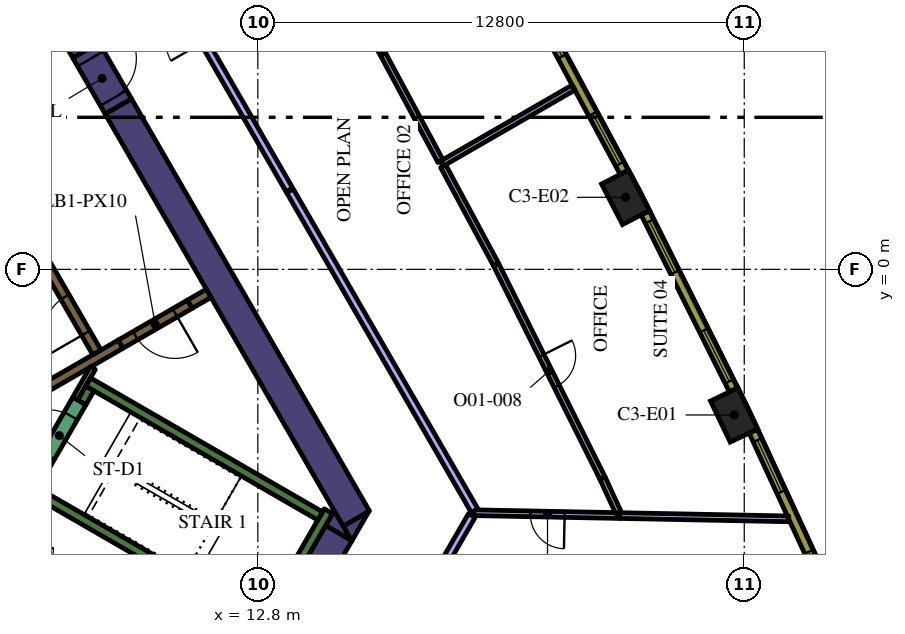
"""IFC4 building model, lengths in metres.
Left out: names, types, materials, properties, quantities, classifications, styles, units other than length and angle.
Written with IfcOpenShell. Run it as: python <this file> out.ifc"""

import sys

from ifc_helpers import new_model, si_unit, direction, frame, frame_2d, origin, origin_2d, place, context, subcontext, project, spatial, polyline, rectangle, outline, extrude, element, fill, save


model = new_model("IFC4")
c1 = context("Model", 3, precision=1e-05, world=origin(), true_north=direction((0.0, 1.0)))
c2 = subcontext(c1, "Body", "Model", "MODEL_VIEW")
j1 = project(units=[si_unit("LENGTHUNIT", "METRE"), si_unit("PLANEANGLEUNIT", "RADIAN")], contexts=[c1])
p1 = place(None, origin())
s1 = spatial("IfcSite", under=j1, at=p1, CompositionType="ELEMENT")
p2 = place(p1, origin())
s2 = spatial("IfcBuilding", under=s1, at=p2, CompositionType="ELEMENT")
p3 = place(p2, frame((0.0, 0.0, 150.0)))
s3 = spatial("IfcBuildingStorey", under=s2, at=p3, CompositionType="ELEMENT", Elevation=150.0)
for number, where, z_axis, x_axis in (
    (1, (25.332, -3.832, 0.0), (0.0, 0.0, 1.0), (-0.433, 0.902, 0.0)),
    (2, (22.476, 1.896, 0.0), (0.0, 0.0, 1.0), (-0.46, 0.888, 0.0)),
):
    element("IfcColumn", number, at=place(p3, frame(where, z_axis=z_axis, x_axis=x_axis)), inside=s3, PredefinedType="COLUMN", context=c2, shape_type="SweptSolid", body=[
        extrude(rectangle(XDim=1.2, YDim=0.8, at=origin_2d()), origin(), (0.0, 0.0, 1.0), 4.2),
    ])
p4 = place(p3, frame((9.129, 4.289, 0.0), z_axis=(0.0, 0.0, 1.0), x_axis=(0.499995742806, -0.866027861663, 0.0)))
e3 = element("IfcWall", 3, at=p4, inside=s3, PredefinedType="SOLIDWALL", context=c2, shape_type="SweptSolid", body=[
    extrude(rectangle(XDim=12.527, YDim=0.8, at=frame_2d((6.264, 0.0))), origin(), (0.0, 0.0, 1.0), 4.2),
])
p5 = place(p3, origin())
e4 = element("IfcWall", 4, at=p5, inside=s3, PredefinedType="SOLIDWALL", context=c2, shape_type="SweptSolid", body=[
    extrude(outline(polyline([(15.271, -7.15), (15.047, -6.762), (15.719, -6.374), (15.271, -7.15)])), origin(), (0.0, 0.0, 1.0), 4.2),
])
p6 = place(p3, frame((13.018, -10.252, 0.0), z_axis=(0.0, 0.0, 1.0), x_axis=(0.499984020225, 0.866034629516, 0.0)))
e5 = element("IfcWall", 5, at=p6, inside=s3, PredefinedType="SOLIDWALL", context=c2, shape_type="SweptSolid", body=[
    extrude(rectangle(XDim=3.824, YDim=0.8, at=frame_2d((1.912, 0.0))), origin(), (0.0, 0.0, 1.0), 4.2),
])
e6 = element("IfcWall", 6, at=p5, inside=s3, PredefinedType="SOLIDWALL", context=c2, shape_type="SweptSolid", body=[
    extrude(outline(polyline([(14.809, -6.35), (15.257, -7.126), (14.585, -6.738), (14.809, -6.35)])), origin(), (0.0, 0.0, 1.0), 4.2),
])
p7 = place(p3, frame((5.615, 10.375, 0.0), z_axis=(0.0, 0.0, 1.0), x_axis=(0.500002746266, -0.866023818221, 0.0)))
e7 = element("IfcWall", 7, at=p7, inside=s3, PredefinedType="SOLIDWALL", context=c2, shape_type="SweptSolid", body=[
    extrude(rectangle(XDim=5.328, YDim=0.8, at=frame_2d((2.664, 0.0))), origin(), (0.0, 0.0, 1.0), 4.2),
])
p8 = place(p3, frame((12.84, -9.511, 0.0), z_axis=(0.0, 0.0, 1.0), x_axis=(0.499997733992, 0.866026712061, 0.0)))
e8 = element("IfcWall", 8, at=p8, inside=s3, PredefinedType="SOLIDWALL", context=c2, shape_type="SweptSolid", body=[
    extrude(rectangle(XDim=3.634, YDim=0.25, at=frame_2d((1.817, 0.0))), origin(), (0.0, 0.0, 1.0), 4.2),
])
p9 = place(p3, frame((12.84, -9.261, 0.0), z_axis=(0.0, 0.0, 1.0), x_axis=(-0.866013990052, 0.500019768644, 0.0)))
e9 = element("IfcWall", 9, at=p9, inside=s3, PredefinedType="SOLIDWALL", context=c2, shape_type="SweptSolid", body=[
    extrude(rectangle(XDim=6.8, YDim=0.25, at=frame_2d((3.4, 0.0))), origin(), (0.0, 0.0, 1.0), 4.2),
])
p10 = place(p3, frame((8.334, -2.964, 0.0), z_axis=(0.0, 0.0, 1.0), x_axis=(0.866016039709, -0.500016218704, 0.0)))
e10 = element("IfcWall", 10, at=p10, inside=s3, PredefinedType="SOLIDWALL", context=c2, shape_type="SweptSolid", body=[
    extrude(rectangle(XDim=7.05, YDim=0.25, at=frame_2d((3.525, 0.0))), origin(), (0.0, 0.0, 1.0), 4.2),
])
p11 = place(p3, frame((8.168, -3.503, 0.0), z_axis=(0.0, 0.0, 1.0), x_axis=(0.49972245349, 0.866185586049, 0.0)))
e11 = element("IfcWall", 11, at=p11, inside=s3, PredefinedType="SOLIDWALL", context=c2, shape_type="SweptSolid", body=[
    extrude(rectangle(XDim=0.425, YDim=0.25, at=frame_2d((0.212, 0.0))), origin(), (0.0, 0.0, 1.0), 4.2),
])
p12 = place(p3, frame((9.19, -1.969, 0.0), z_axis=(0.0, 0.0, 1.0), x_axis=(-0.866057109641, -0.499945079824, 0.0)))
e12 = element("IfcWall", 12, at=p12, inside=s3, PredefinedType="SOLIDWALL", context=c2, shape_type="SweptSolid", body=[
    extrude(rectangle(XDim=3.291, YDim=0.25, at=frame_2d((1.646, 0.0))), origin(), (0.0, 0.0, 1.0), 4.2),
])
p13 = place(p3, frame((11.507, -0.631, 0.0), z_axis=(0.0, 0.0, 1.0), x_axis=(-0.866093731455, -0.499881634324, 0.0)))
e13 = element("IfcWall", 13, at=p13, inside=s3, PredefinedType="SOLIDWALL", context=c2, shape_type="SweptSolid", body=[
    extrude(rectangle(XDim=0.575, YDim=0.25, at=frame_2d((0.288, 0.0))), origin(), (0.0, 0.0, 1.0), 4.2),
])
p14 = place(p3, frame((8.459, -2.599, 0.0), z_axis=(0.0, 0.0, 1.0), x_axis=(-0.500041054325, -0.866001699761, 0.0)))
e14 = element("IfcWall", 14, at=p14, inside=s3, PredefinedType="PARTITIONING", context=c2, shape_type="SweptSolid", body=[
    extrude(rectangle(XDim=0.929, YDim=0.15, at=frame_2d((0.464, 0.0))), origin(), (0.0, 0.0, 1.0), 4.2),
])
p15 = place(p3, frame((8.565, -2.185, 0.0), z_axis=(0.0, 0.0, 1.0), x_axis=(-0.499997954832, 0.866026584559, 0.0)))
e15 = element("IfcWall", 15, at=p15, inside=s3, PredefinedType="SOLIDWALL", context=c2, shape_type="SweptSolid", body=[
    extrude(rectangle(XDim=12.35, YDim=0.25, at=frame_2d((6.175, 0.0))), origin(), (0.0, 0.0, 1.0), 4.2),
])
p16 = place(p15, frame((0.585, 0.0, 0.0)))
e16 = element("IfcOpeningElement", 16, at=p16, cuts=e15, PredefinedType="OPENING", context=c2, shape_type="SweptSolid", body=[
    extrude(rectangle(XDim=1.1, YDim=2.1, at=frame_2d((0.55, 1.05))), frame((0.0, 0.135, 0.0), z_axis=(0.0, -1.0, 0.0), x_axis=(1.0, 0.0, 0.0)), (0.0, 0.0, 1.0), 0.27),
])
p17 = place(p3, frame((7.053, -5.284, 0.0), z_axis=(0.0, 0.0, 1.0), x_axis=(0.500078061341, 0.865980330357, 0.0)))
e17 = element("IfcWall", 17, at=p17, inside=s3, PredefinedType="SOLIDWALL", context=c2, shape_type="SweptSolid", body=[
    extrude(rectangle(XDim=2.1, YDim=0.4, at=frame_2d((1.05, 0.0))), origin(), (0.0, 0.0, 1.0), 4.2),
])
p18 = place(p17, frame((0.45, 0.0, 0.0)))
e18 = element("IfcOpeningElement", 18, at=p18, cuts=e17, PredefinedType="OPENING", context=c2, shape_type="SweptSolid", body=[
    extrude(rectangle(XDim=1.2, YDim=2.1, at=frame_2d((0.6, 1.05))), frame((0.0, 0.21, 0.0), z_axis=(0.0, -1.0, 0.0), x_axis=(1.0, 0.0, 0.0)), (0.0, 0.0, 1.0), 0.42),
])
p19 = place(p3, frame((11.009, -0.919, 0.0), z_axis=(0.0, 0.0, 1.0), x_axis=(-0.866059744384, -0.49994051562, 0.0)))
e19 = element("IfcWall", 19, at=p19, inside=s3, PredefinedType="SOLIDWALL", context=c2, shape_type="SweptSolid", body=[
    extrude(rectangle(XDim=2.1, YDim=0.25, at=frame_2d((1.05, 0.0))), origin(), (0.0, 0.0, 1.0), 4.2),
])
p20 = place(p19, frame((0.45, 0.0, 0.0)))
e20 = element("IfcOpeningElement", 20, at=p20, cuts=e19, PredefinedType="OPENING", context=c2, shape_type="SweptSolid", body=[
    extrude(rectangle(XDim=1.2, YDim=2.1, at=frame_2d((0.6, 1.05))), frame((0.0, 0.135, 0.0), z_axis=(0.0, -1.0, 0.0), x_axis=(1.0, 0.0, 0.0)), (0.0, 0.0, 1.0), 0.27),
])
p21 = place(p3, frame((8.279, 5.761, 0.0), z_axis=(0.0, 0.0, 1.0), x_axis=(0.500062241894, -0.865989465428, 0.0)))
e21 = element("IfcWall", 21, at=p21, inside=s3, PredefinedType="SOLIDWALL", context=c2, shape_type="SweptSolid", body=[
    extrude(rectangle(XDim=1.7, YDim=0.8, at=frame_2d((0.85, 0.0))), origin(), (0.0, 0.0, 1.0), 4.2),
])
p22 = place(p21, frame((0.25, 0.0, 0.0)))
e22 = element("IfcOpeningElement", 22, at=p22, cuts=e21, PredefinedType="OPENING", context=c2, shape_type="SweptSolid", body=[
    extrude(rectangle(XDim=1.2, YDim=2.1, at=frame_2d((0.6, 1.05))), frame((0.0, 0.41, 0.0), z_axis=(0.0, -1.0, 0.0), x_axis=(1.0, 0.0, 0.0)), (0.0, 0.0, 1.0), 0.82),
])
p23 = place(p3, frame((22.32, -6.479, 0.0), z_axis=(0.0, 0.0, 1.0), x_axis=(0.999809252738, -0.019530953357, 0.0)))
e23 = element("IfcWall", 23, at=p23, inside=s3, PredefinedType="PARTITIONING", context=c2, shape_type="SweptSolid", body=[
    extrude(rectangle(XDim=4.45, YDim=0.15, at=frame_2d((2.225, 0.0))), origin(), (0.0, 0.0, 1.0), 3.15),
])
p24 = place(p3, frame((22.328, -6.479, 0.0), z_axis=(0.0, 0.0, 1.0), x_axis=(-0.999809811932, 0.019502306655, 0.0)))
e24 = element("IfcWall", 24, at=p24, inside=s3, PredefinedType="PARTITIONING", context=c2, shape_type="SweptSolid", body=[
    extrude(rectangle(XDim=3.856, YDim=0.15, at=frame_2d((1.928, 0.0))), origin(), (0.0, 0.0, 1.0), 3.15),
])
p25 = place(p24, frame((1.456, 0.0, 0.0)))
e25 = element("IfcOpeningElement", 25, at=p25, cuts=e24, PredefinedType="OPENING", context=c2, shape_type="SweptSolid", body=[
    extrude(rectangle(XDim=0.9, YDim=2.1, at=frame_2d((0.45, 1.05))), frame((0.0, 0.085, 0.0), z_axis=(0.0, -1.0, 0.0), x_axis=(1.0, 0.0, 0.0)), (0.0, 0.0, 1.0), 0.17),
])
p26 = place(p3, frame((16.678, -9.513, 0.0), z_axis=(0.0, 0.0, 1.0), x_axis=(0.500011844827, 0.866018565062, 0.0)))
e26 = element("IfcWall", 26, at=p26, inside=s3, PredefinedType="PARTITIONING", context=c2, shape_type="SweptSolid", body=[
    extrude(rectangle(XDim=3.505, YDim=0.2, at=frame_2d((1.753, 0.0))), origin(), (0.0, 0.0, 1.0), 3.15),
])
p27 = place(p3, frame((17.641, 2.781, 0.0), z_axis=(0.0, 0.0, 1.0), x_axis=(0.866053520969, 0.499951296445, 0.0)))
e27 = element("IfcWall", 27, at=p27, inside=s3, PredefinedType="PARTITIONING", context=c2, shape_type="SweptSolid", body=[
    extrude(rectangle(XDim=4.002, YDim=0.15, at=frame_2d((2.001, 0.0))), origin(), (0.0, 0.0, 1.0), 3.15),
])
p28 = place(p3, frame((22.289, -6.403, 0.0), z_axis=(0.0, 0.0, 1.0), x_axis=(-0.41893460807, 0.908016406328, 0.0)))
e28 = element("IfcWall", 28, at=p28, inside=s3, PredefinedType="PARTITIONING", context=c2, shape_type="SweptSolid", body=[
    extrude(rectangle(XDim=1.002, YDim=0.15, at=frame_2d((0.501, 0.0))), origin(), (0.0, 0.0, 1.0), 3.15),
])
p29 = place(p3, frame((19.066, 0.129, 0.0), z_axis=(0.0, 0.0, 1.0), x_axis=(0.446202922071, -0.89493181435, 0.0)))
e29 = element("IfcWall", 29, at=p29, inside=s3, PredefinedType="PARTITIONING", context=c2, shape_type="SweptSolid", body=[
    extrude(rectangle(XDim=6.282, YDim=0.15, at=frame_2d((3.141, 0.0))), origin(), (0.0, 0.0, 1.0), 3.15),
])
p30 = place(p29, frame((2.683, 0.0, 0.0)))
e30 = element("IfcOpeningElement", 30, at=p30, cuts=e29, PredefinedType="OPENING", context=c2, shape_type="SweptSolid", body=[
    extrude(rectangle(XDim=0.9, YDim=2.1, at=frame_2d((0.45, 1.05))), frame((0.0, 0.085, 0.0), z_axis=(0.0, -1.0, 0.0), x_axis=(1.0, 0.0, 0.0)), (0.0, 0.0, 1.0), 0.17),
])
p31 = place(p3, frame((19.066, 0.129, 0.0), z_axis=(0.0, 0.0, 1.0), x_axis=(-0.473335829303, 0.880882053795, 0.0)))
e31 = element("IfcWall", 31, at=p31, inside=s3, PredefinedType="PARTITIONING", context=c2, shape_type="SweptSolid", body=[
    extrude(rectangle(XDim=2.935, YDim=0.15, at=frame_2d((1.468, 0.0))), origin(), (0.0, 0.0, 1.0), 3.15),
])
p32 = place(p3, frame((17.606, 2.847, 0.0), z_axis=(0.0, 0.0, 1.0), x_axis=(-0.473348321673, 0.880875340993, 0.0)))
e32 = element("IfcWall", 32, at=p32, inside=s3, PredefinedType="PARTITIONING", context=c2, shape_type="SweptSolid", body=[
    extrude(rectangle(XDim=3.197, YDim=0.15, at=frame_2d((1.599, 0.0))), origin(), (0.0, 0.0, 1.0), 3.15),
])
p33 = place(p3, frame((12.951, 11.104, 0.0), z_axis=(0.0, 0.0, 1.0), x_axis=(0.499992691614, -0.866029623242, 0.0)))
e33 = element("IfcWall", 33, at=p33, inside=s3, PredefinedType="PARTITIONING", context=c2, shape_type="SweptSolid", body=[
    extrude(rectangle(XDim=6.282, YDim=0.15, at=frame_2d((3.141, 0.0))), origin(), (0.0, 0.0, 1.0), 3.15),
])
p34 = place(p33, frame((2.683, 0.0, 0.0)))
e34 = element("IfcOpeningElement", 34, at=p34, cuts=e33, PredefinedType="OPENING", context=c2, shape_type="SweptSolid", body=[
    extrude(rectangle(XDim=0.9, YDim=2.1, at=frame_2d((0.45, 1.05))), frame((0.0, 0.085, 0.0), z_axis=(0.0, -1.0, 0.0), x_axis=(1.0, 0.0, 0.0)), (0.0, 0.0, 1.0), 0.17),
])
p35 = place(p3, frame((13.63, 2.091, 0.0), z_axis=(0.0, 0.0, 1.0), x_axis=(-0.499990634175, 0.866030811078, 0.0)))
e35 = element("IfcWall", 35, at=p35, inside=s3, PredefinedType="PARTITIONING", context=c2, shape_type="SweptSolid", body=[
    extrude(rectangle(XDim=10.008, YDim=0.2, at=frame_2d((5.004, 0.0))), origin(), (0.0, 0.0, 1.0), 3.15),
])
p36 = place(p35, frame((4.5, 0.0, 0.0)))
e36 = element("IfcOpeningElement", 36, at=p36, cuts=e35, PredefinedType="OPENING", context=c2, shape_type="SweptSolid", body=[
    extrude(rectangle(XDim=1.0, YDim=2.1, at=frame_2d((0.5, 1.05))), frame((0.0, 0.11, 0.0), z_axis=(0.0, -1.0, 0.0), x_axis=(1.0, 0.0, 0.0)), (0.0, 0.0, 1.0), 0.22),
])
p37 = place(p3, frame((18.504, -6.35, 0.0), z_axis=(0.0, 0.0, 1.0), x_axis=(-0.499995029582, 0.866028273438, 0.0)))
e37 = element("IfcWall", 37, at=p37, inside=s3, PredefinedType="PARTITIONING", context=c2, shape_type="SweptSolid", body=[
    extrude(rectangle(XDim=9.717, YDim=0.2, at=frame_2d((4.859, 0.0))), origin(), (0.0, 0.0, 1.0), 3.15),
])
p38 = place(p3, frame((28.02, -8.992, 0.0), z_axis=(0.0, 0.0, 1.0), x_axis=(-0.418722559465, 0.908114209885, 0.0)))
e38 = element("IfcWall", 38, at=p38, inside=s3, PredefinedType="SOLIDWALL", context=c2, shape_type="SweptSolid", body=[
    extrude(rectangle(XDim=5.213, YDim=0.24, at=frame_2d((2.606, 0.0))), origin(), (0.0, 0.0, 1.0), 3.95),
])
p39 = place(p38, frame((0.221, 0.0, 0.9)))
e39 = element("IfcOpeningElement", 39, at=p39, cuts=e38, PredefinedType="OPENING", context=c2, shape_type="SweptSolid", body=[
    extrude(rectangle(XDim=1.5, YDim=2.55, at=frame_2d((0.75, 1.275))), frame((0.0, 0.13, 0.0), z_axis=(0.0, -1.0, 0.0), x_axis=(1.0, 0.0, 0.0)), (0.0, 0.0, 1.0), 0.26),
])
p40 = place(p38, frame((3.452, 0.0, 0.9)))
e40 = element("IfcOpeningElement", 40, at=p40, cuts=e38, PredefinedType="OPENING", context=c2, shape_type="SweptSolid", body=[
    extrude(rectangle(XDim=1.5, YDim=2.55, at=frame_2d((0.75, 1.275))), frame((0.0, 0.13, 0.0), z_axis=(0.0, -1.0, 0.0), x_axis=(1.0, 0.0, 0.0)), (0.0, 0.0, 1.0), 0.26),
])
p41 = place(p3, frame((25.316, -3.171, 0.0), z_axis=(0.0, 0.0, 1.0), x_axis=(-0.446256171312, 0.8949052629, 0.0)))
e41 = element("IfcWall", 41, at=p41, inside=s3, PredefinedType="SOLIDWALL", context=c2, shape_type="SweptSolid", body=[
    extrude(rectangle(XDim=5.203, YDim=0.24, at=frame_2d((2.602, 0.0))), origin(), (0.0, 0.0, 1.0), 3.95),
])
p42 = place(p41, frame((0.248, 0.0, 0.9)))
e42 = element("IfcOpeningElement", 42, at=p42, cuts=e41, PredefinedType="OPENING", context=c2, shape_type="SweptSolid", body=[
    extrude(rectangle(XDim=1.5, YDim=2.55, at=frame_2d((0.75, 1.275))), frame((0.0, 0.13, 0.0), z_axis=(0.0, -1.0, 0.0), x_axis=(1.0, 0.0, 0.0)), (0.0, 0.0, 1.0), 0.26),
])
p43 = place(p41, frame((3.455, 0.0, 0.9)))
e43 = element("IfcOpeningElement", 43, at=p43, cuts=e41, PredefinedType="OPENING", context=c2, shape_type="SweptSolid", body=[
    extrude(rectangle(XDim=1.5, YDim=2.55, at=frame_2d((0.75, 1.275))), frame((0.0, 0.13, 0.0), z_axis=(0.0, -1.0, 0.0), x_axis=(1.0, 0.0, 0.0)), (0.0, 0.0, 1.0), 0.26),
])
p44 = place(p3, frame((22.44, 2.555, 0.0), z_axis=(0.0, 0.0, 1.0), x_axis=(-0.473349833294, 0.880874528704, 0.0)))
e44 = element("IfcWall", 44, at=p44, inside=s3, PredefinedType="SOLIDWALL", context=c2, shape_type="SweptSolid", body=[
    extrude(rectangle(XDim=5.204, YDim=0.24, at=frame_2d((2.602, 0.0))), origin(), (0.0, 0.0, 1.0), 3.95),
])
p45 = place(p44, frame((0.248, 0.0, 0.9)))
e45 = element("IfcOpeningElement", 45, at=p45, cuts=e44, PredefinedType="OPENING", context=c2, shape_type="SweptSolid", body=[
    extrude(rectangle(XDim=1.5, YDim=2.55, at=frame_2d((0.75, 1.275))), frame((0.0, 0.13, 0.0), z_axis=(0.0, -1.0, 0.0), x_axis=(1.0, 0.0, 0.0)), (0.0, 0.0, 1.0), 0.26),
])
p46 = place(p44, frame((3.455, 0.0, 0.9)))
e46 = element("IfcOpeningElement", 46, at=p46, cuts=e44, PredefinedType="OPENING", context=c2, shape_type="SweptSolid", body=[
    extrude(rectangle(XDim=1.5, YDim=2.55, at=frame_2d((0.75, 1.275))), frame((0.0, 0.13, 0.0), z_axis=(0.0, -1.0, 0.0), x_axis=(1.0, 0.0, 0.0)), (0.0, 0.0, 1.0), 0.26),
])
p47 = place(p16, origin())
e47 = element("IfcDoor", 47, at=p47, inside=s3, OperationType="DOUBLE_DOOR_SLIDING", PredefinedType="DOOR", context=c2, shape_type="SweptSolid", body=[
    extrude(rectangle(XDim=1.1, YDim=2.1, at=frame_2d((0.55, 1.05))), frame((0.0, 0.025, 0.0), z_axis=(0.0, -1.0, 0.0), x_axis=(1.0, 0.0, 0.0)), (0.0, 0.0, 1.0), 0.05),
])
fill(e16, e47)
p48 = place(p18, origin())
e48 = element("IfcDoor", 48, at=p48, inside=s3, OperationType="SINGLE_SWING_LEFT", PredefinedType="DOOR", context=c2, shape_type="SweptSolid", body=[
    extrude(rectangle(XDim=1.2, YDim=2.1, at=frame_2d((0.6, 1.05))), frame((0.0, 0.025, 0.0), z_axis=(0.0, -1.0, 0.0), x_axis=(1.0, 0.0, 0.0)), (0.0, 0.0, 1.0), 0.05),
])
fill(e18, e48)
p49 = place(p20, origin())
e49 = element("IfcDoor", 49, at=p49, inside=s3, OperationType="SINGLE_SWING_LEFT", PredefinedType="DOOR", context=c2, shape_type="SweptSolid", body=[
    extrude(rectangle(XDim=1.2, YDim=2.1, at=frame_2d((0.6, 1.05))), frame((0.0, 0.025, 0.0), z_axis=(0.0, -1.0, 0.0), x_axis=(1.0, 0.0, 0.0)), (0.0, 0.0, 1.0), 0.05),
])
fill(e20, e49)
p50 = place(p22, origin())
e50 = element("IfcDoor", 50, at=p50, inside=s3, OperationType="SINGLE_SWING_LEFT", PredefinedType="DOOR", context=c2, shape_type="SweptSolid", body=[
    extrude(rectangle(XDim=1.2, YDim=2.1, at=frame_2d((0.6, 1.05))), frame((0.0, 0.025, 0.0), z_axis=(0.0, -1.0, 0.0), x_axis=(1.0, 0.0, 0.0)), (0.0, 0.0, 1.0), 0.05),
])
fill(e22, e50)
p51 = place(p25, origin())
e51 = element("IfcDoor", 51, at=p51, inside=s3, OperationType="SINGLE_SWING_LEFT", PredefinedType="DOOR", context=c2, shape_type="SweptSolid", body=[
    extrude(rectangle(XDim=0.9, YDim=2.1, at=frame_2d((0.45, 1.05))), frame((0.0, 0.025, 0.0), z_axis=(0.0, -1.0, 0.0), x_axis=(1.0, 0.0, 0.0)), (0.0, 0.0, 1.0), 0.05),
])
fill(e25, e51)
p52 = place(p30, origin())
e52 = element("IfcDoor", 52, at=p52, inside=s3, OperationType="SINGLE_SWING_LEFT", PredefinedType="DOOR", context=c2, shape_type="SweptSolid", body=[
    extrude(rectangle(XDim=0.9, YDim=2.1, at=frame_2d((0.45, 1.05))), frame((0.0, 0.025, 0.0), z_axis=(0.0, -1.0, 0.0), x_axis=(1.0, 0.0, 0.0)), (0.0, 0.0, 1.0), 0.05),
])
fill(e30, e52)
p53 = place(p39, origin())
e53 = element("IfcWindow", 53, at=p53, inside=s3, PartitioningType="SINGLE_PANEL", PredefinedType="WINDOW", context=c2, shape_type="SweptSolid", body=[
    extrude(rectangle(XDim=1.5, YDim=2.55, at=frame_2d((0.75, 1.275))), frame((0.0, 0.04, 0.0), z_axis=(0.0, -1.0, 0.0), x_axis=(1.0, 0.0, 0.0)), (0.0, 0.0, 1.0), 0.06),
])
fill(e39, e53)
p54 = place(p40, origin())
e54 = element("IfcWindow", 54, at=p54, inside=s3, PartitioningType="SINGLE_PANEL", PredefinedType="WINDOW", context=c2, shape_type="SweptSolid", body=[
    extrude(rectangle(XDim=1.5, YDim=2.55, at=frame_2d((0.75, 1.275))), frame((0.0, 0.04, 0.0), z_axis=(0.0, -1.0, 0.0), x_axis=(1.0, 0.0, 0.0)), (0.0, 0.0, 1.0), 0.06),
])
fill(e40, e54)
p55 = place(p42, origin())
e55 = element("IfcWindow", 55, at=p55, inside=s3, PartitioningType="SINGLE_PANEL", PredefinedType="WINDOW", context=c2, shape_type="SweptSolid", body=[
    extrude(rectangle(XDim=1.5, YDim=2.55, at=frame_2d((0.75, 1.275))), frame((0.0, 0.04, 0.0), z_axis=(0.0, -1.0, 0.0), x_axis=(1.0, 0.0, 0.0)), (0.0, 0.0, 1.0), 0.06),
])
fill(e42, e55)
p56 = place(p43, origin())
e56 = element("IfcWindow", 56, at=p56, inside=s3, PartitioningType="SINGLE_PANEL", PredefinedType="WINDOW", context=c2, shape_type="SweptSolid", body=[
    extrude(rectangle(XDim=1.5, YDim=2.55, at=frame_2d((0.75, 1.275))), frame((0.0, 0.04, 0.0), z_axis=(0.0, -1.0, 0.0), x_axis=(1.0, 0.0, 0.0)), (0.0, 0.0, 1.0), 0.06),
])
fill(e43, e56)
p57 = place(p45, origin())
e57 = element("IfcWindow", 57, at=p57, inside=s3, PartitioningType="SINGLE_PANEL", PredefinedType="WINDOW", context=c2, shape_type="SweptSolid", body=[
    extrude(rectangle(XDim=1.5, YDim=2.55, at=frame_2d((0.75, 1.275))), frame((0.0, 0.04, 0.0), z_axis=(0.0, -1.0, 0.0), x_axis=(1.0, 0.0, 0.0)), (0.0, 0.0, 1.0), 0.06),
])
fill(e45, e57)
p58 = place(p46, origin())
e58 = element("IfcWindow", 58, at=p58, inside=s3, PartitioningType="SINGLE_PANEL", PredefinedType="WINDOW", context=c2, shape_type="SweptSolid", body=[
    extrude(rectangle(XDim=1.5, YDim=2.55, at=frame_2d((0.75, 1.275))), frame((0.0, 0.04, 0.0), z_axis=(0.0, -1.0, 0.0), x_axis=(1.0, 0.0, 0.0)), (0.0, 0.0, 1.0), 0.06),
])
fill(e46, e58)
save(model, sys.argv[1])
